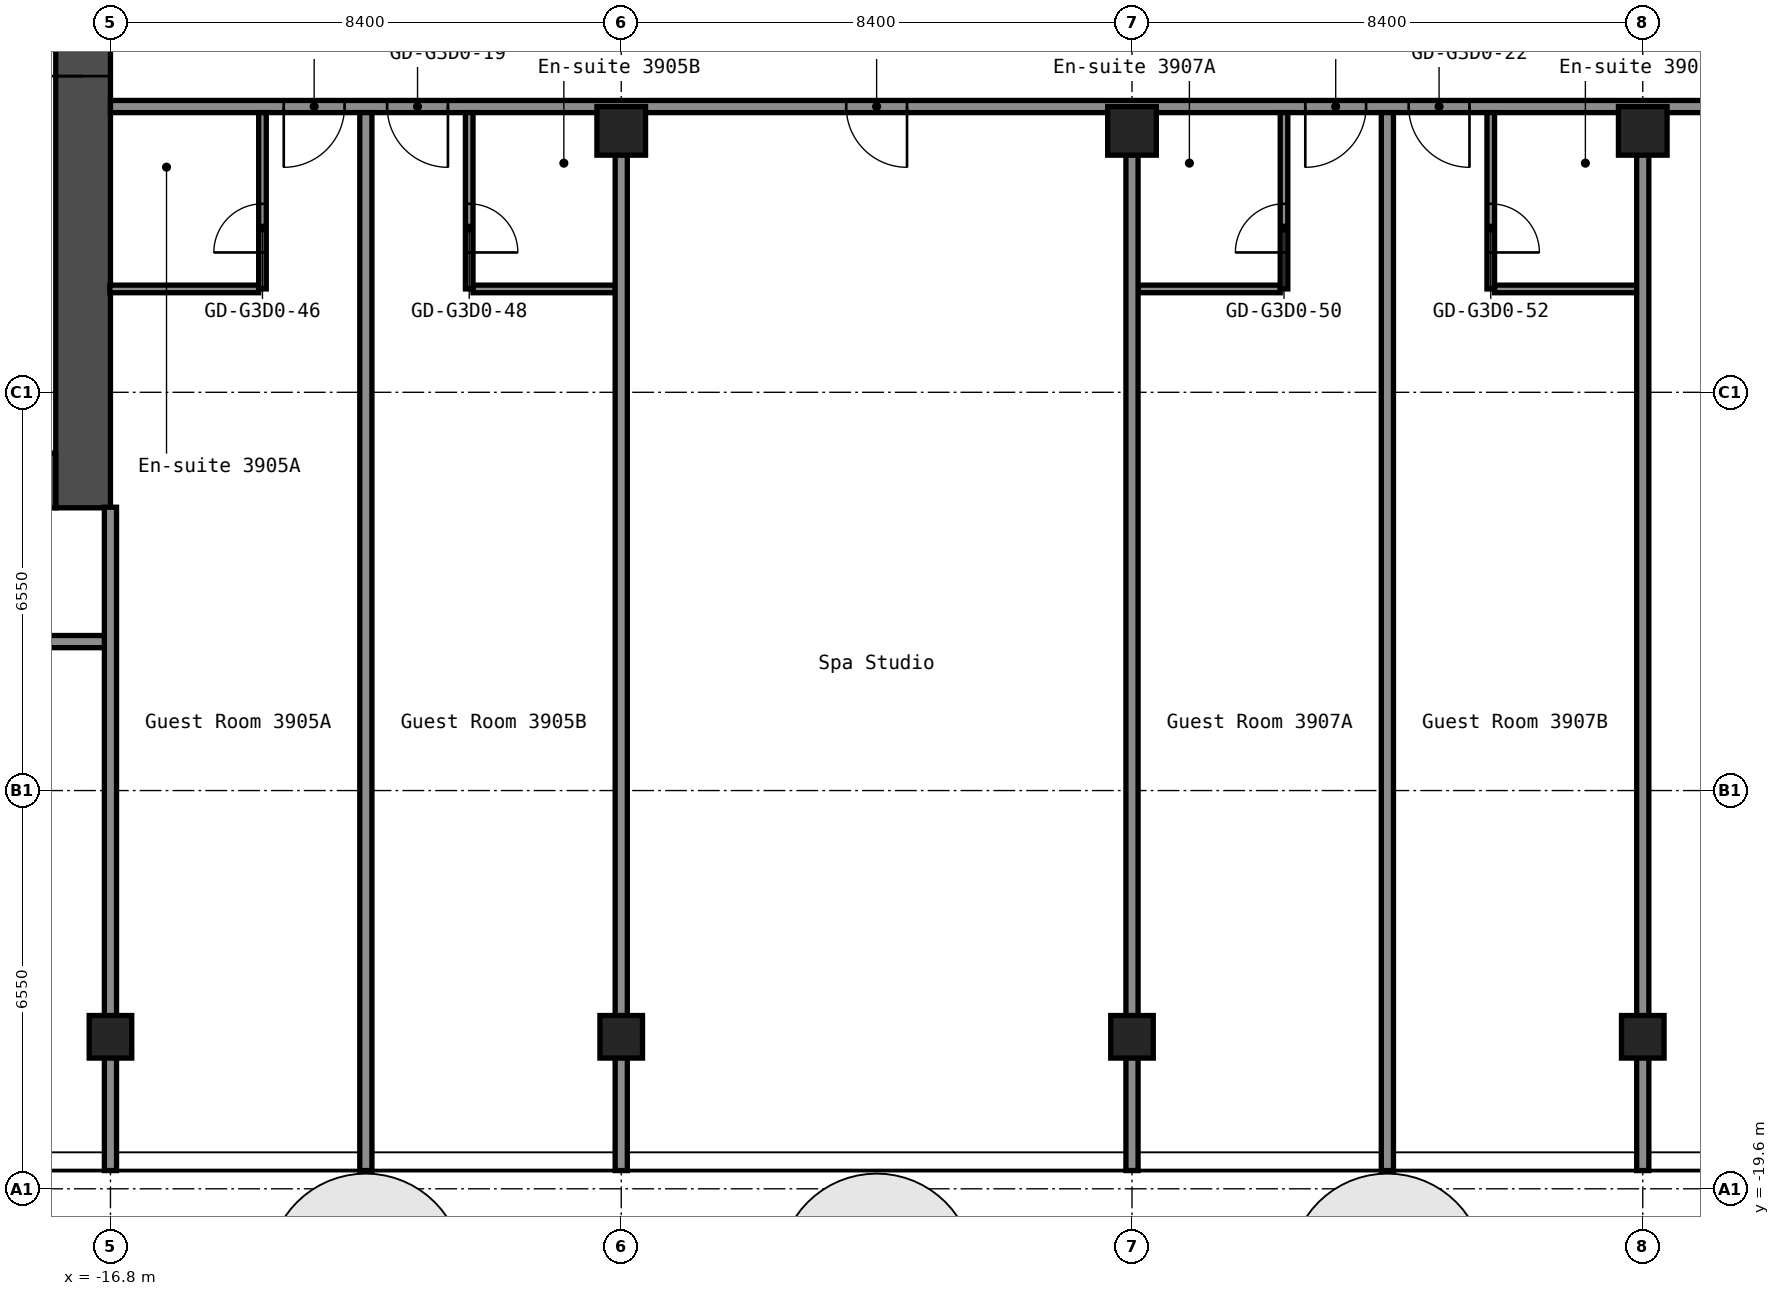
"""IFC4 building model, lengths in metres.
Left out: names, types, materials, properties, quantities, classifications, styles, units other than length and angle.
Written with IfcOpenShell. Run it as: python <this file> out.ifc"""

import sys

from ifc_helpers import new_model, si_unit, direction, frame, frame_2d, origin, origin_2d, place, context, subcontext, project, spatial, rectangle, hollow_rectangle, extrude, element, fill, save


model = new_model("IFC4")
c1 = context("Model", 3, precision=1e-05, world=origin(), true_north=direction((0.0, 1.0)))
c2 = subcontext(c1, "Body", "Model", "MODEL_VIEW")
j1 = project(units=[si_unit("LENGTHUNIT", "METRE"), si_unit("PLANEANGLEUNIT", "RADIAN")], contexts=[c1])
p1 = place(None, origin())
s1 = spatial("IfcSite", under=j1, at=p1, CompositionType="ELEMENT")
p2 = place(p1, origin())
s2 = spatial("IfcBuilding", under=s1, at=p2, CompositionType="ELEMENT")
p3 = place(p2, frame((0.0, 0.0, 140.6)))
s3 = spatial("IfcBuildingStorey", under=s2, at=p3, CompositionType="ELEMENT", Elevation=140.6)
for number, where, z_axis, x_axis in (
    (1, (-16.8, -17.1, 0.0), (0.0, 0.0, 1.0), (1.0, 0.0, 0.0)),
    (2, (-8.4, -17.1, 0.0), (0.0, 0.0, 1.0), (1.0, 0.0, 0.0)),
):
    element("IfcColumn", number, at=place(p3, frame(where, z_axis=z_axis, x_axis=x_axis)), inside=s3, PredefinedType="COLUMN", context=c2, shape_type="SweptSolid", body=[
        extrude(hollow_rectangle(XDim=0.7, YDim=0.7, WallThickness=0.028, at=origin_2d()), origin(), (0.0, 0.0, 1.0), 2.75),
    ])
p4 = place(p3, frame((-8.4, -2.2, 0.0), z_axis=(0.0, 0.0, 1.0), x_axis=(1.0, 0.0, 0.0)))
e3 = element("IfcColumn", 3, at=p4, inside=s3, PredefinedType="COLUMN", context=c2, shape_type="SweptSolid", body=[
    extrude(hollow_rectangle(XDim=0.8, YDim=0.8, WallThickness=0.032, at=origin_2d()), origin(), (0.0, 0.0, 1.0), 2.75),
])
p5 = place(p3, frame((0.0, -17.1, 0.0), z_axis=(0.0, 0.0, 1.0), x_axis=(1.0, 0.0, 0.0)))
e4 = element("IfcColumn", 4, at=p5, inside=s3, PredefinedType="COLUMN", context=c2, shape_type="SweptSolid", body=[
    extrude(hollow_rectangle(XDim=0.7, YDim=0.7, WallThickness=0.028, at=origin_2d()), origin(), (0.0, 0.0, 1.0), 2.75),
])
p6 = place(p3, frame((0.0, -2.2, 0.0), z_axis=(0.0, 0.0, 1.0), x_axis=(1.0, 0.0, 0.0)))
e5 = element("IfcColumn", 5, at=p6, inside=s3, PredefinedType="COLUMN", context=c2, shape_type="SweptSolid", body=[
    extrude(hollow_rectangle(XDim=0.8, YDim=0.8, WallThickness=0.032, at=origin_2d()), origin(), (0.0, 0.0, 1.0), 2.75),
])
p7 = place(p3, frame((8.4, -17.1, 0.0), z_axis=(0.0, 0.0, 1.0), x_axis=(1.0, 0.0, 0.0)))
e6 = element("IfcColumn", 6, at=p7, inside=s3, PredefinedType="COLUMN", context=c2, shape_type="SweptSolid", body=[
    extrude(hollow_rectangle(XDim=0.7, YDim=0.7, WallThickness=0.028, at=origin_2d()), origin(), (0.0, 0.0, 1.0), 2.75),
])
p8 = place(p3, frame((8.4, -2.2, 0.0), z_axis=(0.0, 0.0, 1.0), x_axis=(1.0, 0.0, 0.0)))
e7 = element("IfcColumn", 7, at=p8, inside=s3, PredefinedType="COLUMN", context=c2, shape_type="SweptSolid", body=[
    extrude(hollow_rectangle(XDim=0.8, YDim=0.8, WallThickness=0.032, at=origin_2d()), origin(), (0.0, 0.0, 1.0), 2.75),
])
p9 = place(p3, frame((-17.25, -8.4, 0.0), z_axis=(0.0, 0.0, 1.0), x_axis=(0.0, 1.0, 0.0)))
e8 = element("IfcWall", 8, at=p9, inside=s3, PredefinedType="SHEAR", context=c2, shape_type="SweptSolid", body=[
    extrude(rectangle(XDim=16.8, YDim=0.9, at=frame_2d((8.4, 0.0))), origin(), (0.0, 0.0, 1.0), 2.75),
])
p10 = place(p9, frame((7.1, 0.0, 0.0)))
e9 = element("IfcOpeningElement", 9, at=p10, cuts=e8, PredefinedType="OPENING", context=c2, shape_type="SweptSolid", body=[
    extrude(rectangle(XDim=1.6, YDim=2.1, at=frame_2d((0.8, 1.05))), frame((0.0, 0.46, 0.0), z_axis=(0.0, -1.0, 0.0), x_axis=(1.0, 0.0, 0.0)), (0.0, 0.0, 1.0), 0.92),
])
p11 = place(p3, frame((-32.7, -7.95, 0.0), z_axis=(0.0, 0.0, 1.0), x_axis=(1.0, 0.0, 0.0)))
e10 = element("IfcWall", 10, at=p11, inside=s3, PredefinedType="SHEAR", context=c2, shape_type="SweptSolid", body=[
    extrude(rectangle(XDim=15.0, YDim=0.9, at=frame_2d((7.5, 0.0))), origin(), (0.0, 0.0, 1.0), 2.75),
])
p12 = place(p11, frame((11.45, 0.0, 0.0)))
e11 = element("IfcOpeningElement", 11, at=p12, cuts=e10, PredefinedType="OPENING", context=c2, shape_type="SweptSolid", body=[
    extrude(rectangle(XDim=1.0, YDim=2.1, at=frame_2d((0.5, 1.05))), frame((0.0, 0.46, 0.0), z_axis=(0.0, -1.0, 0.0), x_axis=(1.0, 0.0, 0.0)), (0.0, 0.0, 1.0), 0.92),
])
p13 = place(p3, frame((-42.7, -10.6, 0.0), z_axis=(0.0, 0.0, 1.0), x_axis=(1.0, 0.0, 0.0)))
e12 = element("IfcWall", 12, at=p13, inside=s3, PredefinedType="PARTITIONING", context=c2, shape_type="SweptSolid", body=[
    extrude(rectangle(XDim=25.9, YDim=0.2, at=frame_2d((12.95, 0.0))), origin(), (0.0, 0.0, 1.0), 2.75),
])
p14 = place(p13, frame((2.5, 0.0, 0.0)))
e13 = element("IfcOpeningElement", 13, at=p14, cuts=e12, PredefinedType="OPENING", context=c2, shape_type="SweptSolid", body=[
    extrude(rectangle(XDim=1.0, YDim=2.1, at=frame_2d((0.5, 1.05))), frame((0.0, 0.11, 0.0), z_axis=(0.0, -1.0, 0.0), x_axis=(1.0, 0.0, 0.0)), (0.0, 0.0, 1.0), 0.22),
])
p15 = place(p13, frame((11.95, 0.0, 0.0)))
e14 = element("IfcOpeningElement", 14, at=p15, cuts=e12, PredefinedType="OPENING", context=c2, shape_type="SweptSolid", body=[
    extrude(rectangle(XDim=1.0, YDim=2.1, at=frame_2d((0.5, 1.05))), frame((0.0, 0.11, 0.0), z_axis=(0.0, -1.0, 0.0), x_axis=(1.0, 0.0, 0.0)), (0.0, 0.0, 1.0), 0.22),
])
p16 = place(p13, frame((13.65, 0.0, 0.0)))
e15 = element("IfcOpeningElement", 15, at=p16, cuts=e12, PredefinedType="OPENING", context=c2, shape_type="SweptSolid", body=[
    extrude(rectangle(XDim=1.0, YDim=2.1, at=frame_2d((0.5, 1.05))), frame((0.0, 0.11, 0.0), z_axis=(0.0, -1.0, 0.0), x_axis=(1.0, 0.0, 0.0)), (0.0, 0.0, 1.0), 0.22),
])
p17 = place(p13, frame((22.9, 0.0, 0.0)))
e16 = element("IfcOpeningElement", 16, at=p17, cuts=e12, PredefinedType="OPENING", context=c2, shape_type="SweptSolid", body=[
    extrude(rectangle(XDim=1.0, YDim=2.1, at=frame_2d((0.5, 1.05))), frame((0.0, 0.11, 0.0), z_axis=(0.0, -1.0, 0.0), x_axis=(1.0, 0.0, 0.0)), (0.0, 0.0, 1.0), 0.22),
])
p18 = place(p3, frame((-16.81, -4.8, 0.0), z_axis=(0.0, 0.0, 1.0), x_axis=(1.0, 0.0, 0.0)))
e17 = element("IfcWall", 17, at=p18, inside=s3, PredefinedType="PARTITIONING", context=c2, shape_type="SweptSolid", body=[
    extrude(rectangle(XDim=2.448, YDim=0.125, at=frame_2d((1.224, 0.0))), origin(), (0.0, 0.0, 1.0), 2.75),
])
for number, where, z_axis, x_axis in (
    (18, (-10.837, -4.8, 0.0), (0.0, 0.0, 1.0), (1.0, 0.0, 0.0)),
    (19, (0.1, -4.8, 0.0), (0.0, 0.0, 1.0), (1.0, 0.0, 0.0)),
):
    element("IfcWall", number, at=place(p3, frame(where, z_axis=z_axis, x_axis=x_axis)), inside=s3, PredefinedType="PARTITIONING", context=c2, shape_type="SweptSolid", body=[
        extrude(rectangle(XDim=2.337, YDim=0.125, at=frame_2d((1.169, 0.0))), origin(), (0.0, 0.0, 1.0), 2.75),
    ])
p19 = place(p3, frame((5.962, -4.8, 0.0), z_axis=(0.0, 0.0, 1.0), x_axis=(1.0, 0.0, 0.0)))
e20 = element("IfcWall", 20, at=p19, inside=s3, PredefinedType="PARTITIONING", context=c2, shape_type="SweptSolid", body=[
    extrude(rectangle(XDim=2.338, YDim=0.125, at=frame_2d((1.169, 0.0))), origin(), (0.0, 0.0, 1.0), 2.75),
])
p20 = place(p3, frame((-16.8, -1.8, 0.0), z_axis=(0.0, 0.0, 1.0), x_axis=(1.0, 0.0, 0.0)))
e21 = element("IfcWall", 21, at=p20, inside=s3, PredefinedType="PARTITIONING", context=c2, shape_type="SweptSolid", body=[
    extrude(rectangle(XDim=33.6, YDim=0.2, at=frame_2d((16.8, 0.0))), origin(), (0.0, 0.0, 1.0), 2.75),
])
p21 = place(p20, frame((2.85, 0.0, 0.0)))
e22 = element("IfcOpeningElement", 22, at=p21, cuts=e21, PredefinedType="OPENING", context=c2, shape_type="SweptSolid", body=[
    extrude(rectangle(XDim=1.0, YDim=2.1, at=frame_2d((0.5, 1.05))), frame((0.0, 0.11, 0.0), z_axis=(0.0, -1.0, 0.0), x_axis=(1.0, 0.0, 0.0)), (0.0, 0.0, 1.0), 0.22),
])
p22 = place(p20, frame((4.55, 0.0, 0.0)))
e23 = element("IfcOpeningElement", 23, at=p22, cuts=e21, PredefinedType="OPENING", context=c2, shape_type="SweptSolid", body=[
    extrude(rectangle(XDim=1.0, YDim=2.1, at=frame_2d((0.5, 1.05))), frame((0.0, 0.11, 0.0), z_axis=(0.0, -1.0, 0.0), x_axis=(1.0, 0.0, 0.0)), (0.0, 0.0, 1.0), 0.22),
])
p23 = place(p20, frame((12.1, 0.0, 0.0)))
e24 = element("IfcOpeningElement", 24, at=p23, cuts=e21, PredefinedType="OPENING", context=c2, shape_type="SweptSolid", body=[
    extrude(rectangle(XDim=1.0, YDim=2.1, at=frame_2d((0.5, 1.05))), frame((0.0, 0.11, 0.0), z_axis=(0.0, -1.0, 0.0), x_axis=(1.0, 0.0, 0.0)), (0.0, 0.0, 1.0), 0.22),
])
p24 = place(p20, frame((19.65, 0.0, 0.0)))
e25 = element("IfcOpeningElement", 25, at=p24, cuts=e21, PredefinedType="OPENING", context=c2, shape_type="SweptSolid", body=[
    extrude(rectangle(XDim=1.0, YDim=2.1, at=frame_2d((0.5, 1.05))), frame((0.0, 0.11, 0.0), z_axis=(0.0, -1.0, 0.0), x_axis=(1.0, 0.0, 0.0)), (0.0, 0.0, 1.0), 0.22),
])
p25 = place(p20, frame((21.35, 0.0, 0.0)))
e26 = element("IfcOpeningElement", 26, at=p25, cuts=e21, PredefinedType="OPENING", context=c2, shape_type="SweptSolid", body=[
    extrude(rectangle(XDim=1.0, YDim=2.1, at=frame_2d((0.5, 1.05))), frame((0.0, 0.11, 0.0), z_axis=(0.0, -1.0, 0.0), x_axis=(1.0, 0.0, 0.0)), (0.0, 0.0, 1.0), 0.22),
])
p26 = place(p20, frame((27.2, 0.0, 0.0)))
e27 = element("IfcOpeningElement", 27, at=p26, cuts=e21, PredefinedType="OPENING", context=c2, shape_type="SweptSolid", body=[
    extrude(rectangle(XDim=1.0, YDim=2.1, at=frame_2d((0.5, 1.05))), frame((0.0, 0.11, 0.0), z_axis=(0.0, -1.0, 0.0), x_axis=(1.0, 0.0, 0.0)), (0.0, 0.0, 1.0), 0.22),
])
p27 = place(p3, frame((-16.8, -19.3, 0.0), z_axis=(0.0, 0.0, 1.0), x_axis=(0.0, 1.0, 0.0)))
e28 = element("IfcWall", 28, at=p27, inside=s3, PredefinedType="PARTITIONING", context=c2, shape_type="SweptSolid", body=[
    extrude(rectangle(XDim=10.91, YDim=0.2, at=frame_2d((5.455, 0.0))), origin(), (0.0, 0.0, 1.0), 2.75),
])
p28 = place(p3, frame((-14.3, -4.8, 0.0), z_axis=(0.0, 0.0, 1.0), x_axis=(0.0, 1.0, 0.0)))
e29 = element("IfcWall", 29, at=p28, inside=s3, PredefinedType="PARTITIONING", context=c2, shape_type="SweptSolid", body=[
    extrude(rectangle(XDim=2.9, YDim=0.125, at=frame_2d((1.45, 0.0))), origin(), (0.0, 0.0, 1.0), 2.75),
])
p29 = place(p28, frame((0.6, 0.0, 0.0)))
e30 = element("IfcOpeningElement", 30, at=p29, cuts=e29, PredefinedType="OPENING", context=c2, shape_type="SweptSolid", body=[
    extrude(rectangle(XDim=0.8, YDim=2.1, at=frame_2d((0.4, 1.05))), frame((0.0, 0.073, 0.0), z_axis=(0.0, -1.0, 0.0), x_axis=(1.0, 0.0, 0.0)), (0.0, 0.0, 1.0), 0.145),
])
p30 = place(p3, frame((-12.6, -19.3, 0.0), z_axis=(0.0, 0.0, 1.0), x_axis=(0.0, 1.0, 0.0)))
e31 = element("IfcWall", 31, at=p30, inside=s3, PredefinedType="PARTITIONING", context=c2, shape_type="SweptSolid", body=[
    extrude(rectangle(XDim=17.4, YDim=0.2, at=frame_2d((8.7, 0.0))), origin(), (0.0, 0.0, 1.0), 2.75),
])
p31 = place(p3, frame((-10.9, -4.8, 0.0), z_axis=(0.0, 0.0, 1.0), x_axis=(0.0, 1.0, 0.0)))
e32 = element("IfcWall", 32, at=p31, inside=s3, PredefinedType="PARTITIONING", context=c2, shape_type="SweptSolid", body=[
    extrude(rectangle(XDim=2.9, YDim=0.125, at=frame_2d((1.45, 0.0))), origin(), (0.0, 0.0, 1.0), 2.75),
])
p32 = place(p31, frame((0.6, 0.0, 0.0)))
e33 = element("IfcOpeningElement", 33, at=p32, cuts=e32, PredefinedType="OPENING", context=c2, shape_type="SweptSolid", body=[
    extrude(rectangle(XDim=0.8, YDim=2.1, at=frame_2d((0.4, 1.05))), frame((0.0, 0.073, 0.0), z_axis=(0.0, -1.0, 0.0), x_axis=(1.0, 0.0, 0.0)), (0.0, 0.0, 1.0), 0.145),
])
for number, where, z_axis, x_axis in (
    (34, (-8.4, -19.3, 0.0), (0.0, 0.0, 1.0), (0.0, 1.0, 0.0)),
    (35, (0.0, -19.3, 0.0), (0.0, 0.0, 1.0), (0.0, 1.0, 0.0)),
):
    element("IfcWall", number, at=place(p3, frame(where, z_axis=z_axis, x_axis=x_axis)), inside=s3, PredefinedType="PARTITIONING", context=c2, shape_type="SweptSolid", body=[
        extrude(rectangle(XDim=16.71, YDim=0.2, at=frame_2d((8.355, 0.0))), origin(), (0.0, 0.0, 1.0), 2.75),
    ])
p33 = place(p3, frame((2.5, -4.8, 0.0), z_axis=(0.0, 0.0, 1.0), x_axis=(0.0, 1.0, 0.0)))
e36 = element("IfcWall", 36, at=p33, inside=s3, PredefinedType="PARTITIONING", context=c2, shape_type="SweptSolid", body=[
    extrude(rectangle(XDim=2.9, YDim=0.125, at=frame_2d((1.45, 0.0))), origin(), (0.0, 0.0, 1.0), 2.75),
])
p34 = place(p33, frame((0.6, 0.0, 0.0)))
e37 = element("IfcOpeningElement", 37, at=p34, cuts=e36, PredefinedType="OPENING", context=c2, shape_type="SweptSolid", body=[
    extrude(rectangle(XDim=0.8, YDim=2.1, at=frame_2d((0.4, 1.05))), frame((0.0, 0.073, 0.0), z_axis=(0.0, -1.0, 0.0), x_axis=(1.0, 0.0, 0.0)), (0.0, 0.0, 1.0), 0.145),
])
p35 = place(p3, frame((4.2, -19.3, 0.0), z_axis=(0.0, 0.0, 1.0), x_axis=(0.0, 1.0, 0.0)))
e38 = element("IfcWall", 38, at=p35, inside=s3, PredefinedType="PARTITIONING", context=c2, shape_type="SweptSolid", body=[
    extrude(rectangle(XDim=17.4, YDim=0.2, at=frame_2d((8.7, 0.0))), origin(), (0.0, 0.0, 1.0), 2.75),
])
p36 = place(p3, frame((5.9, -4.8, 0.0), z_axis=(0.0, 0.0, 1.0), x_axis=(0.0, 1.0, 0.0)))
e39 = element("IfcWall", 39, at=p36, inside=s3, PredefinedType="PARTITIONING", context=c2, shape_type="SweptSolid", body=[
    extrude(rectangle(XDim=2.9, YDim=0.125, at=frame_2d((1.45, 0.0))), origin(), (0.0, 0.0, 1.0), 2.75),
])
p37 = place(p36, frame((0.6, 0.0, 0.0)))
e40 = element("IfcOpeningElement", 40, at=p37, cuts=e39, PredefinedType="OPENING", context=c2, shape_type="SweptSolid", body=[
    extrude(rectangle(XDim=0.8, YDim=2.1, at=frame_2d((0.4, 1.05))), frame((0.0, 0.073, 0.0), z_axis=(0.0, -1.0, 0.0), x_axis=(1.0, 0.0, 0.0)), (0.0, 0.0, 1.0), 0.145),
])
p38 = place(p3, frame((8.4, -19.3, 0.0), z_axis=(0.0, 0.0, 1.0), x_axis=(0.0, 1.0, 0.0)))
e41 = element("IfcWall", 41, at=p38, inside=s3, PredefinedType="PARTITIONING", context=c2, shape_type="SweptSolid", body=[
    extrude(rectangle(XDim=16.71, YDim=0.2, at=frame_2d((8.355, 0.0))), origin(), (0.0, 0.0, 1.0), 2.75),
])
p39 = place(p10, origin())
e42 = element("IfcDoor", 42, at=p39, inside=s3, OperationType="DOUBLE_DOOR_SINGLE_SWING", PredefinedType="DOOR", context=c2, shape_type="SweptSolid", body=[
    extrude(rectangle(XDim=1.6, YDim=2.1, at=frame_2d((0.8, 1.05))), frame((0.0, 0.025, 0.0), z_axis=(0.0, -1.0, 0.0), x_axis=(1.0, 0.0, 0.0)), (0.0, 0.0, 1.0), 0.05),
])
fill(e9, e42)
p40 = place(p21, origin())
e43 = element("IfcDoor", 43, at=p40, inside=s3, OperationType="SINGLE_SWING_LEFT", PredefinedType="DOOR", context=c2, shape_type="SweptSolid", body=[
    extrude(rectangle(XDim=1.0, YDim=2.1, at=frame_2d((0.5, 1.05))), frame((0.0, 0.025, 0.0), z_axis=(0.0, -1.0, 0.0), x_axis=(1.0, 0.0, 0.0)), (0.0, 0.0, 1.0), 0.05),
])
fill(e22, e43)
p41 = place(p22, origin())
e44 = element("IfcDoor", 44, at=p41, inside=s3, OperationType="SINGLE_SWING_RIGHT", PredefinedType="DOOR", context=c2, shape_type="SweptSolid", body=[
    extrude(rectangle(XDim=1.0, YDim=2.1, at=frame_2d((0.5, 1.05))), frame((0.0, 0.025, 0.0), z_axis=(0.0, -1.0, 0.0), x_axis=(1.0, 0.0, 0.0)), (0.0, 0.0, 1.0), 0.05),
])
fill(e23, e44)
p42 = place(p23, origin())
e45 = element("IfcDoor", 45, at=p42, inside=s3, OperationType="SINGLE_SWING_RIGHT", PredefinedType="DOOR", context=c2, shape_type="SweptSolid", body=[
    extrude(rectangle(XDim=1.0, YDim=2.1, at=frame_2d((0.5, 1.05))), frame((0.0, 0.025, 0.0), z_axis=(0.0, -1.0, 0.0), x_axis=(1.0, 0.0, 0.0)), (0.0, 0.0, 1.0), 0.05),
])
fill(e24, e45)
p43 = place(p24, origin())
e46 = element("IfcDoor", 46, at=p43, inside=s3, OperationType="SINGLE_SWING_LEFT", PredefinedType="DOOR", context=c2, shape_type="SweptSolid", body=[
    extrude(rectangle(XDim=1.0, YDim=2.1, at=frame_2d((0.5, 1.05))), frame((0.0, 0.025, 0.0), z_axis=(0.0, -1.0, 0.0), x_axis=(1.0, 0.0, 0.0)), (0.0, 0.0, 1.0), 0.05),
])
fill(e25, e46)
p44 = place(p25, origin())
e47 = element("IfcDoor", 47, at=p44, inside=s3, OperationType="SINGLE_SWING_RIGHT", PredefinedType="DOOR", context=c2, shape_type="SweptSolid", body=[
    extrude(rectangle(XDim=1.0, YDim=2.1, at=frame_2d((0.5, 1.05))), frame((0.0, 0.025, 0.0), z_axis=(0.0, -1.0, 0.0), x_axis=(1.0, 0.0, 0.0)), (0.0, 0.0, 1.0), 0.05),
])
fill(e26, e47)
p45 = place(p29, origin())
e48 = element("IfcDoor", 48, at=p45, inside=s3, OperationType="SINGLE_SWING_RIGHT", PredefinedType="DOOR", context=c2, shape_type="SweptSolid", body=[
    extrude(rectangle(XDim=0.8, YDim=2.1, at=frame_2d((0.4, 1.05))), frame((0.0, 0.025, 0.0), z_axis=(0.0, -1.0, 0.0), x_axis=(1.0, 0.0, 0.0)), (0.0, 0.0, 1.0), 0.05),
])
fill(e30, e48)
p46 = place(p32, origin())
e49 = element("IfcDoor", 49, at=p46, inside=s3, OperationType="SINGLE_SWING_LEFT", PredefinedType="DOOR", context=c2, shape_type="SweptSolid", body=[
    extrude(rectangle(XDim=0.8, YDim=2.1, at=frame_2d((0.4, 1.05))), frame((0.0, 0.025, 0.0), z_axis=(0.0, -1.0, 0.0), x_axis=(1.0, 0.0, 0.0)), (0.0, 0.0, 1.0), 0.05),
])
fill(e33, e49)
p47 = place(p34, origin())
e50 = element("IfcDoor", 50, at=p47, inside=s3, OperationType="SINGLE_SWING_RIGHT", PredefinedType="DOOR", context=c2, shape_type="SweptSolid", body=[
    extrude(rectangle(XDim=0.8, YDim=2.1, at=frame_2d((0.4, 1.05))), frame((0.0, 0.025, 0.0), z_axis=(0.0, -1.0, 0.0), x_axis=(1.0, 0.0, 0.0)), (0.0, 0.0, 1.0), 0.05),
])
fill(e37, e50)
p48 = place(p37, origin())
e51 = element("IfcDoor", 51, at=p48, inside=s3, OperationType="SINGLE_SWING_LEFT", PredefinedType="DOOR", context=c2, shape_type="SweptSolid", body=[
    extrude(rectangle(XDim=0.8, YDim=2.1, at=frame_2d((0.4, 1.05))), frame((0.0, 0.025, 0.0), z_axis=(0.0, -1.0, 0.0), x_axis=(1.0, 0.0, 0.0)), (0.0, 0.0, 1.0), 0.05),
])
fill(e40, e51)
save(model, sys.argv[1])
